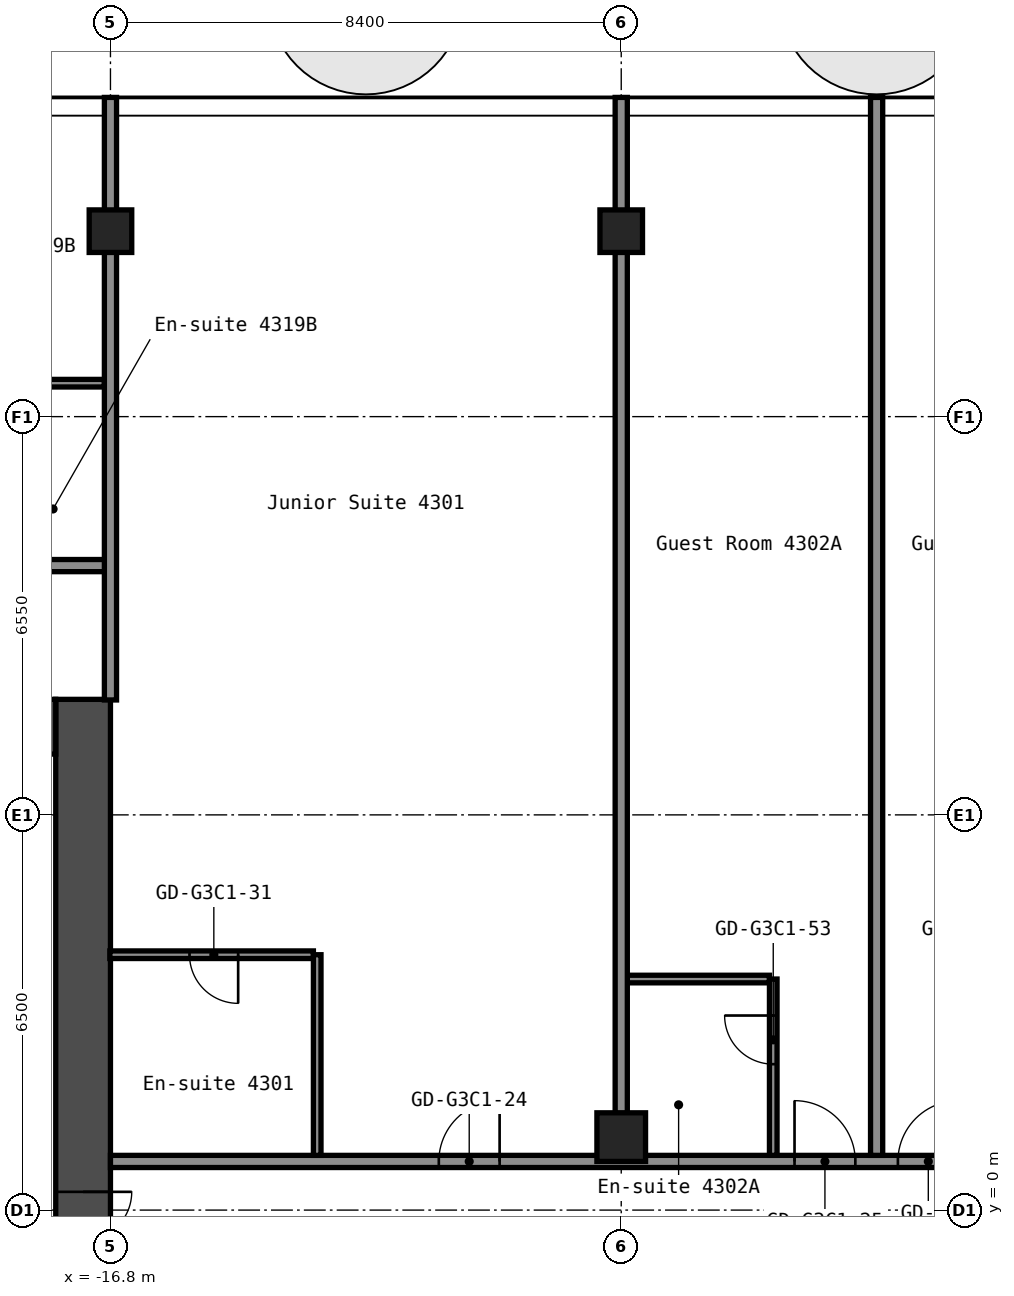
"""IFC4 building model, lengths in metres.
Left out: names, types, materials, properties, quantities, classifications, styles, units other than length and angle.
Written with IfcOpenShell. Run it as: python <this file> out.ifc"""

import sys

from ifc_helpers import new_model, si_unit, direction, frame, frame_2d, origin, origin_2d, place, context, subcontext, project, spatial, rectangle, hollow_rectangle, extrude, element, fill, save


model = new_model("IFC4")
c1 = context("Model", 3, precision=1e-05, world=origin(), true_north=direction((0.0, 1.0)))
c2 = subcontext(c1, "Body", "Model", "MODEL_VIEW")
j1 = project(units=[si_unit("LENGTHUNIT", "METRE"), si_unit("PLANEANGLEUNIT", "RADIAN")], contexts=[c1])
p1 = place(None, origin())
s1 = spatial("IfcSite", under=j1, at=p1, CompositionType="ELEMENT")
p2 = place(p1, origin())
s2 = spatial("IfcBuilding", under=s1, at=p2, CompositionType="ELEMENT")
p3 = place(p2, frame((0.0, 0.0, 153.4)))
s3 = spatial("IfcBuildingStorey", under=s2, at=p3, CompositionType="ELEMENT", Elevation=153.4)
p4 = place(p3, frame((-16.8, 16.1, 0.0), z_axis=(0.0, 0.0, 1.0), x_axis=(1.0, 0.0, 0.0)))
e1 = element("IfcColumn", 1, at=p4, inside=s3, PredefinedType="COLUMN", context=c2, shape_type="SweptSolid", body=[
    extrude(hollow_rectangle(XDim=0.7, YDim=0.7, WallThickness=0.028, at=origin_2d()), origin(), (0.0, 0.0, 1.0), 2.75),
])
p5 = place(p3, frame((-8.4, 1.2, 0.0), z_axis=(0.0, 0.0, 1.0), x_axis=(1.0, 0.0, 0.0)))
e2 = element("IfcColumn", 2, at=p5, inside=s3, PredefinedType="COLUMN", context=c2, shape_type="SweptSolid", body=[
    extrude(hollow_rectangle(XDim=0.8, YDim=0.8, WallThickness=0.032, at=origin_2d()), origin(), (0.0, 0.0, 1.0), 2.75),
])
p6 = place(p3, frame((-8.4, 16.1, 0.0), z_axis=(0.0, 0.0, 1.0), x_axis=(1.0, 0.0, 0.0)))
e3 = element("IfcColumn", 3, at=p6, inside=s3, PredefinedType="COLUMN", context=c2, shape_type="SweptSolid", body=[
    extrude(hollow_rectangle(XDim=0.7, YDim=0.7, WallThickness=0.028, at=origin_2d()), origin(), (0.0, 0.0, 1.0), 2.75),
])
p7 = place(p3, frame((-17.25, -8.4, 0.0), z_axis=(0.0, 0.0, 1.0), x_axis=(0.0, 1.0, 0.0)))
e4 = element("IfcWall", 4, at=p7, inside=s3, PredefinedType="SHEAR", context=c2, shape_type="SweptSolid", body=[
    extrude(rectangle(XDim=16.8, YDim=0.9, at=frame_2d((8.4, 0.0))), origin(), (0.0, 0.0, 1.0), 2.75),
])
p8 = place(p7, frame((7.1, 0.0, 0.0)))
e5 = element("IfcOpeningElement", 5, at=p8, cuts=e4, PredefinedType="OPENING", context=c2, shape_type="SweptSolid", body=[
    extrude(rectangle(XDim=1.6, YDim=2.1, at=frame_2d((0.8, 1.05))), frame((0.0, 0.46, 0.0), z_axis=(0.0, -1.0, 0.0), x_axis=(1.0, 0.0, 0.0)), (0.0, 0.0, 1.0), 0.92),
])
p9 = place(p3, frame((-32.7, 7.95, 0.0), z_axis=(0.0, 0.0, 1.0), x_axis=(1.0, 0.0, 0.0)))
e6 = element("IfcWall", 6, at=p9, inside=s3, PredefinedType="SHEAR", context=c2, shape_type="SweptSolid", body=[
    extrude(rectangle(XDim=15.0, YDim=0.9, at=frame_2d((7.5, 0.0))), origin(), (0.0, 0.0, 1.0), 2.75),
])
p10 = place(p9, frame((3.4, 0.0, 0.0)))
e7 = element("IfcOpeningElement", 7, at=p10, cuts=e6, PredefinedType="OPENING", context=c2, shape_type="SweptSolid", body=[
    extrude(rectangle(XDim=1.2, YDim=2.1, at=frame_2d((0.6, 1.05))), frame((0.0, 0.46, 0.0), z_axis=(0.0, -1.0, 0.0), x_axis=(1.0, 0.0, 0.0)), (0.0, 0.0, 1.0), 0.92),
])
p11 = place(p9, frame((0.75, 0.0, 0.0)))
e8 = element("IfcOpeningElement", 8, at=p11, cuts=e6, PredefinedType="OPENING", context=c2, shape_type="SweptSolid", body=[
    extrude(rectangle(XDim=0.9, YDim=2.1, at=frame_2d((0.45, 1.05))), frame((0.0, 0.46, 0.0), z_axis=(0.0, -1.0, 0.0), x_axis=(1.0, 0.0, 0.0)), (0.0, 0.0, 1.0), 0.92),
])
p12 = place(p3, frame((-16.8, 0.8, 0.0), z_axis=(0.0, 0.0, 1.0), x_axis=(1.0, 0.0, 0.0)))
e9 = element("IfcWall", 9, at=p12, inside=s3, PredefinedType="PARTITIONING", context=c2, shape_type="SweptSolid", body=[
    extrude(rectangle(XDim=33.6, YDim=0.2, at=frame_2d((16.8, 0.0))), origin(), (0.0, 0.0, 1.0), 2.75),
])
p13 = place(p12, frame((5.4, 0.0, 0.0)))
e10 = element("IfcOpeningElement", 10, at=p13, cuts=e9, PredefinedType="OPENING", context=c2, shape_type="SweptSolid", body=[
    extrude(rectangle(XDim=1.0, YDim=2.1, at=frame_2d((0.5, 1.05))), frame((0.0, 0.11, 0.0), z_axis=(0.0, -1.0, 0.0), x_axis=(1.0, 0.0, 0.0)), (0.0, 0.0, 1.0), 0.22),
])
p14 = place(p12, frame((11.25, 0.0, 0.0)))
e11 = element("IfcOpeningElement", 11, at=p14, cuts=e9, PredefinedType="OPENING", context=c2, shape_type="SweptSolid", body=[
    extrude(rectangle(XDim=1.0, YDim=2.1, at=frame_2d((0.5, 1.05))), frame((0.0, 0.11, 0.0), z_axis=(0.0, -1.0, 0.0), x_axis=(1.0, 0.0, 0.0)), (0.0, 0.0, 1.0), 0.22),
])
p15 = place(p12, frame((12.95, 0.0, 0.0)))
e12 = element("IfcOpeningElement", 12, at=p15, cuts=e9, PredefinedType="OPENING", context=c2, shape_type="SweptSolid", body=[
    extrude(rectangle(XDim=1.0, YDim=2.1, at=frame_2d((0.5, 1.05))), frame((0.0, 0.11, 0.0), z_axis=(0.0, -1.0, 0.0), x_axis=(1.0, 0.0, 0.0)), (0.0, 0.0, 1.0), 0.22),
])
p16 = place(p12, frame((18.7, 0.0, 0.0)))
e13 = element("IfcOpeningElement", 13, at=p16, cuts=e9, PredefinedType="OPENING", context=c2, shape_type="SweptSolid", body=[
    extrude(rectangle(XDim=0.9, YDim=2.1, at=frame_2d((0.45, 1.05))), frame((0.0, 0.11, 0.0), z_axis=(0.0, -1.0, 0.0), x_axis=(1.0, 0.0, 0.0)), (0.0, 0.0, 1.0), 0.22),
])
p17 = place(p12, frame((22.9, 0.0, 0.0)))
e14 = element("IfcOpeningElement", 14, at=p17, cuts=e9, PredefinedType="OPENING", context=c2, shape_type="SweptSolid", body=[
    extrude(rectangle(XDim=0.9, YDim=2.1, at=frame_2d((0.45, 1.05))), frame((0.0, 0.11, 0.0), z_axis=(0.0, -1.0, 0.0), x_axis=(1.0, 0.0, 0.0)), (0.0, 0.0, 1.0), 0.22),
])
p18 = place(p12, frame((28.05, 0.0, 0.0)))
e15 = element("IfcOpeningElement", 15, at=p18, cuts=e9, PredefinedType="OPENING", context=c2, shape_type="SweptSolid", body=[
    extrude(rectangle(XDim=1.0, YDim=2.1, at=frame_2d((0.5, 1.05))), frame((0.0, 0.11, 0.0), z_axis=(0.0, -1.0, 0.0), x_axis=(1.0, 0.0, 0.0)), (0.0, 0.0, 1.0), 0.22),
])
p19 = place(p12, frame((29.75, 0.0, 0.0)))
e16 = element("IfcOpeningElement", 16, at=p19, cuts=e9, PredefinedType="OPENING", context=c2, shape_type="SweptSolid", body=[
    extrude(rectangle(XDim=1.0, YDim=2.1, at=frame_2d((0.5, 1.05))), frame((0.0, 0.11, 0.0), z_axis=(0.0, -1.0, 0.0), x_axis=(1.0, 0.0, 0.0)), (0.0, 0.0, 1.0), 0.22),
])
p20 = place(p3, frame((-8.3, 3.8, 0.0), z_axis=(0.0, 0.0, 1.0), x_axis=(1.0, 0.0, 0.0)))
e17 = element("IfcWall", 17, at=p20, inside=s3, PredefinedType="PARTITIONING", context=c2, shape_type="SweptSolid", body=[
    extrude(rectangle(XDim=2.338, YDim=0.125, at=frame_2d((1.169, 0.0))), origin(), (0.0, 0.0, 1.0), 2.75),
])
p21 = place(p3, frame((-16.81, 4.2, 0.0), z_axis=(0.0, 0.0, 1.0), x_axis=(1.0, 0.0, 0.0)))
e18 = element("IfcWall", 18, at=p21, inside=s3, PredefinedType="PARTITIONING", context=c2, shape_type="SweptSolid", body=[
    extrude(rectangle(XDim=3.348, YDim=0.125, at=frame_2d((1.674, 0.0))), origin(), (0.0, 0.0, 1.0), 2.75),
])
p22 = place(p21, frame((1.31, 0.0, 0.0)))
e19 = element("IfcOpeningElement", 19, at=p22, cuts=e18, PredefinedType="OPENING", context=c2, shape_type="SweptSolid", body=[
    extrude(rectangle(XDim=0.8, YDim=2.1, at=frame_2d((0.4, 1.05))), frame((0.0, 0.073, 0.0), z_axis=(0.0, -1.0, 0.0), x_axis=(1.0, 0.0, 0.0)), (0.0, 0.0, 1.0), 0.145),
])
p23 = place(p3, frame((-42.7, 10.6, 0.0), z_axis=(0.0, 0.0, 1.0), x_axis=(1.0, 0.0, 0.0)))
e20 = element("IfcWall", 20, at=p23, inside=s3, PredefinedType="PARTITIONING", context=c2, shape_type="SweptSolid", body=[
    extrude(rectangle(XDim=25.9, YDim=0.2, at=frame_2d((12.95, 0.0))), origin(), (0.0, 0.0, 1.0), 2.75),
])
p24 = place(p23, frame((3.25, 0.0, 0.0)))
e21 = element("IfcOpeningElement", 21, at=p24, cuts=e20, PredefinedType="OPENING", context=c2, shape_type="SweptSolid", body=[
    extrude(rectangle(XDim=1.0, YDim=2.1, at=frame_2d((0.5, 1.05))), frame((0.0, 0.11, 0.0), z_axis=(0.0, -1.0, 0.0), x_axis=(1.0, 0.0, 0.0)), (0.0, 0.0, 1.0), 0.22),
])
p25 = place(p23, frame((5.15, 0.0, 0.0)))
e22 = element("IfcOpeningElement", 22, at=p25, cuts=e20, PredefinedType="OPENING", context=c2, shape_type="SweptSolid", body=[
    extrude(rectangle(XDim=1.0, YDim=2.1, at=frame_2d((0.5, 1.05))), frame((0.0, 0.11, 0.0), z_axis=(0.0, -1.0, 0.0), x_axis=(1.0, 0.0, 0.0)), (0.0, 0.0, 1.0), 0.22),
])
p26 = place(p23, frame((14.5, 0.0, 0.0)))
e23 = element("IfcOpeningElement", 23, at=p26, cuts=e20, PredefinedType="OPENING", context=c2, shape_type="SweptSolid", body=[
    extrude(rectangle(XDim=1.0, YDim=2.1, at=frame_2d((0.5, 1.05))), frame((0.0, 0.11, 0.0), z_axis=(0.0, -1.0, 0.0), x_axis=(1.0, 0.0, 0.0)), (0.0, 0.0, 1.0), 0.22),
])
p27 = place(p23, frame((20.35, 0.0, 0.0)))
e24 = element("IfcOpeningElement", 24, at=p27, cuts=e20, PredefinedType="OPENING", context=c2, shape_type="SweptSolid", body=[
    extrude(rectangle(XDim=1.0, YDim=2.1, at=frame_2d((0.5, 1.05))), frame((0.0, 0.11, 0.0), z_axis=(0.0, -1.0, 0.0), x_axis=(1.0, 0.0, 0.0)), (0.0, 0.0, 1.0), 0.22),
])
p28 = place(p23, frame((22.05, 0.0, 0.0)))
e25 = element("IfcOpeningElement", 25, at=p28, cuts=e20, PredefinedType="OPENING", context=c2, shape_type="SweptSolid", body=[
    extrude(rectangle(XDim=1.0, YDim=2.1, at=frame_2d((0.5, 1.05))), frame((0.0, 0.11, 0.0), z_axis=(0.0, -1.0, 0.0), x_axis=(1.0, 0.0, 0.0)), (0.0, 0.0, 1.0), 0.22),
])
p29 = place(p3, frame((-19.238, 13.6, 0.0), z_axis=(0.0, 0.0, 1.0), x_axis=(1.0, 0.0, 0.0)))
e26 = element("IfcWall", 26, at=p29, inside=s3, PredefinedType="PARTITIONING", context=c2, shape_type="SweptSolid", body=[
    extrude(rectangle(XDim=2.338, YDim=0.125, at=frame_2d((1.169, 0.0))), origin(), (0.0, 0.0, 1.0), 2.75),
])
p30 = place(p3, frame((-16.8, 8.39, 0.0), z_axis=(0.0, 0.0, 1.0), x_axis=(0.0, 1.0, 0.0)))
e27 = element("IfcWall", 27, at=p30, inside=s3, PredefinedType="PARTITIONING", context=c2, shape_type="SweptSolid", body=[
    extrude(rectangle(XDim=9.91, YDim=0.2, at=frame_2d((4.955, 0.0))), origin(), (0.0, 0.0, 1.0), 2.75),
])
p31 = place(p3, frame((-13.4, 0.9, 0.0), z_axis=(0.0, 0.0, 1.0), x_axis=(0.0, 1.0, 0.0)))
e28 = element("IfcWall", 28, at=p31, inside=s3, PredefinedType="PARTITIONING", context=c2, shape_type="SweptSolid", body=[
    extrude(rectangle(XDim=3.3, YDim=0.125, at=frame_2d((1.65, 0.0))), origin(), (0.0, 0.0, 1.0), 2.75),
])
p32 = place(p3, frame((-8.4, 1.59, 0.0), z_axis=(0.0, 0.0, 1.0), x_axis=(0.0, 1.0, 0.0)))
e29 = element("IfcWall", 29, at=p32, inside=s3, PredefinedType="PARTITIONING", context=c2, shape_type="SweptSolid", body=[
    extrude(rectangle(XDim=16.71, YDim=0.2, at=frame_2d((8.355, 0.0))), origin(), (0.0, 0.0, 1.0), 2.75),
])
p33 = place(p3, frame((-5.9, 0.9, 0.0), z_axis=(0.0, 0.0, 1.0), x_axis=(0.0, 1.0, 0.0)))
e30 = element("IfcWall", 30, at=p33, inside=s3, PredefinedType="PARTITIONING", context=c2, shape_type="SweptSolid", body=[
    extrude(rectangle(XDim=2.9, YDim=0.125, at=frame_2d((1.45, 0.0))), origin(), (0.0, 0.0, 1.0), 2.75),
])
p34 = place(p33, frame((1.5, 0.0, 0.0)))
e31 = element("IfcOpeningElement", 31, at=p34, cuts=e30, PredefinedType="OPENING", context=c2, shape_type="SweptSolid", body=[
    extrude(rectangle(XDim=0.8, YDim=2.1, at=frame_2d((0.4, 1.05))), frame((0.0, 0.073, 0.0), z_axis=(0.0, -1.0, 0.0), x_axis=(1.0, 0.0, 0.0)), (0.0, 0.0, 1.0), 0.145),
])
p35 = place(p3, frame((-4.2, 0.9, 0.0), z_axis=(0.0, 0.0, 1.0), x_axis=(0.0, 1.0, 0.0)))
e32 = element("IfcWall", 32, at=p35, inside=s3, PredefinedType="PARTITIONING", context=c2, shape_type="SweptSolid", body=[
    extrude(rectangle(XDim=17.4, YDim=0.2, at=frame_2d((8.7, 0.0))), origin(), (0.0, 0.0, 1.0), 2.75),
])
p36 = place(p8, origin())
e33 = element("IfcDoor", 33, at=p36, inside=s3, OperationType="DOUBLE_DOOR_SINGLE_SWING", PredefinedType="DOOR", context=c2, shape_type="SweptSolid", body=[
    extrude(rectangle(XDim=1.6, YDim=2.1, at=frame_2d((0.8, 1.05))), frame((0.0, 0.025, 0.0), z_axis=(0.0, -1.0, 0.0), x_axis=(1.0, 0.0, 0.0)), (0.0, 0.0, 1.0), 0.05),
])
fill(e5, e33)
p37 = place(p13, origin())
e34 = element("IfcDoor", 34, at=p37, inside=s3, OperationType="SINGLE_SWING_LEFT", PredefinedType="DOOR", context=c2, shape_type="SweptSolid", body=[
    extrude(rectangle(XDim=1.0, YDim=2.1, at=frame_2d((0.5, 1.05))), frame((0.0, 0.025, 0.0), z_axis=(0.0, -1.0, 0.0), x_axis=(1.0, 0.0, 0.0)), (0.0, 0.0, 1.0), 0.05),
])
fill(e10, e34)
p38 = place(p14, origin())
e35 = element("IfcDoor", 35, at=p38, inside=s3, OperationType="SINGLE_SWING_RIGHT", PredefinedType="DOOR", context=c2, shape_type="SweptSolid", body=[
    extrude(rectangle(XDim=1.0, YDim=2.1, at=frame_2d((0.5, 1.05))), frame((0.0, 0.025, 0.0), z_axis=(0.0, -1.0, 0.0), x_axis=(1.0, 0.0, 0.0)), (0.0, 0.0, 1.0), 0.05),
])
fill(e11, e35)
p39 = place(p15, origin())
e36 = element("IfcDoor", 36, at=p39, inside=s3, OperationType="SINGLE_SWING_LEFT", PredefinedType="DOOR", context=c2, shape_type="SweptSolid", body=[
    extrude(rectangle(XDim=1.0, YDim=2.1, at=frame_2d((0.5, 1.05))), frame((0.0, 0.025, 0.0), z_axis=(0.0, -1.0, 0.0), x_axis=(1.0, 0.0, 0.0)), (0.0, 0.0, 1.0), 0.05),
])
fill(e12, e36)
p40 = place(p22, origin())
e37 = element("IfcDoor", 37, at=p40, inside=s3, OperationType="SINGLE_SWING_RIGHT", PredefinedType="DOOR", context=c2, shape_type="SweptSolid", body=[
    extrude(rectangle(XDim=0.8, YDim=2.1, at=frame_2d((0.4, 1.05))), frame((0.0, 0.025, 0.0), z_axis=(0.0, -1.0, 0.0), x_axis=(1.0, 0.0, 0.0)), (0.0, 0.0, 1.0), 0.05),
])
fill(e19, e37)
p41 = place(p34, origin())
e38 = element("IfcDoor", 38, at=p41, inside=s3, OperationType="SINGLE_SWING_LEFT", PredefinedType="DOOR", context=c2, shape_type="SweptSolid", body=[
    extrude(rectangle(XDim=0.8, YDim=2.1, at=frame_2d((0.4, 1.05))), frame((0.0, 0.025, 0.0), z_axis=(0.0, -1.0, 0.0), x_axis=(1.0, 0.0, 0.0)), (0.0, 0.0, 1.0), 0.05),
])
fill(e31, e38)
save(model, sys.argv[1])
